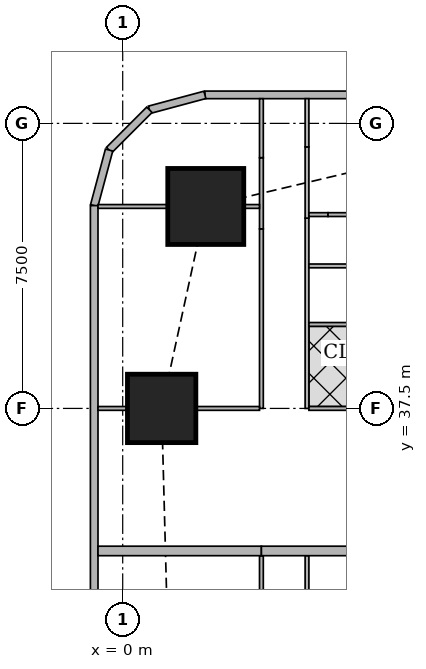
"""IFC4 building model, lengths in metres.
Left out: names, types, materials, properties, quantities, classifications, styles, units other than length and angle.
Written with IfcOpenShell. Run it as: python <this file> out.ifc"""

import sys

from ifc_helpers import new_model, si_unit, direction, frame, frame_2d, origin, origin_2d, place, context, subcontext, project, spatial, rectangle, extrude, element, fill, save


model = new_model("IFC4")
c1 = context("Model", 3, precision=1e-05, world=origin(), true_north=direction((0.0, 1.0)))
c2 = subcontext(c1, "Body", "Model", "MODEL_VIEW")
j1 = project(units=[si_unit("LENGTHUNIT", "METRE"), si_unit("PLANEANGLEUNIT", "RADIAN")], contexts=[c1])
p1 = place(None, origin())
s1 = spatial("IfcSite", under=j1, at=p1, CompositionType="ELEMENT")
p2 = place(p1, origin())
s2 = spatial("IfcBuilding", under=s1, at=p2, CompositionType="ELEMENT")
p3 = place(p2, frame((0.0, 0.0, 147.05)))
s3 = spatial("IfcBuildingStorey", under=s2, at=p3, CompositionType="ELEMENT", Elevation=147.05)
p4 = place(p3, frame((1.025, 37.5, 0.0), z_axis=(0.0, 0.0, 1.0), x_axis=(1.0, 0.0, 0.0)))
e1 = element("IfcColumn", 1, at=p4, inside=s3, PredefinedType="COLUMN", context=c2, shape_type="SweptSolid", body=[
    extrude(rectangle(XDim=1.8, YDim=1.8, at=origin_2d()), origin(), (0.0, 0.0, 1.0), 3.75),
])
p5 = place(p3, frame((2.186, 42.814, 0.0), z_axis=(0.0, 0.0, 1.0), x_axis=(1.0, 0.0, 0.0)))
e2 = element("IfcColumn", 2, at=p5, inside=s3, PredefinedType="COLUMN", context=c2, shape_type="SweptSolid", body=[
    extrude(rectangle(XDim=2.0, YDim=2.0, at=origin_2d()), origin(), (0.0, 0.0, 1.0), 3.75),
])
p6 = place(p3, frame((40.106, 45.75, 0.0), z_axis=(0.0, 0.0, 1.0), x_axis=(-1.0, 0.0, 0.0)))
e3 = element("IfcWall", 3, at=p6, inside=s3, PredefinedType="SOLIDWALL", context=c2, shape_type="SweptSolid", body=[
    extrude(rectangle(XDim=37.943, YDim=0.2, at=frame_2d((18.971, 0.0))), origin(), (0.0, 0.0, 1.0), 3.5),
])
p7 = place(p6, frame((8.606, 0.0, 0.9)))
e4 = element("IfcOpeningElement", 4, at=p7, cuts=e3, PredefinedType="OPENING", context=c2, shape_type="SweptSolid", body=[
    extrude(rectangle(XDim=1.8, YDim=1.5, at=frame_2d((0.9, 0.75))), frame((0.0, 0.11, 0.0), z_axis=(0.0, -1.0, 0.0), x_axis=(1.0, 0.0, 0.0)), (0.0, 0.0, 1.0), 0.22),
])
p8 = place(p6, frame((12.206, 0.0, 0.9)))
e5 = element("IfcOpeningElement", 5, at=p8, cuts=e3, PredefinedType="OPENING", context=c2, shape_type="SweptSolid", body=[
    extrude(rectangle(XDim=1.8, YDim=1.5, at=frame_2d((0.9, 0.75))), frame((0.0, 0.11, 0.0), z_axis=(0.0, -1.0, 0.0), x_axis=(1.0, 0.0, 0.0)), (0.0, 0.0, 1.0), 0.22),
])
p9 = place(p6, frame((15.806, 0.0, 0.9)))
e6 = element("IfcOpeningElement", 6, at=p9, cuts=e3, PredefinedType="OPENING", context=c2, shape_type="SweptSolid", body=[
    extrude(rectangle(XDim=1.8, YDim=1.5, at=frame_2d((0.9, 0.75))), frame((0.0, 0.11, 0.0), z_axis=(0.0, -1.0, 0.0), x_axis=(1.0, 0.0, 0.0)), (0.0, 0.0, 1.0), 0.22),
])
p10 = place(p6, frame((19.406, 0.0, 0.9)))
e7 = element("IfcOpeningElement", 7, at=p10, cuts=e3, PredefinedType="OPENING", context=c2, shape_type="SweptSolid", body=[
    extrude(rectangle(XDim=1.8, YDim=1.5, at=frame_2d((0.9, 0.75))), frame((0.0, 0.11, 0.0), z_axis=(0.0, -1.0, 0.0), x_axis=(1.0, 0.0, 0.0)), (0.0, 0.0, 1.0), 0.22),
])
p11 = place(p6, frame((23.006, 0.0, 0.9)))
e8 = element("IfcOpeningElement", 8, at=p11, cuts=e3, PredefinedType="OPENING", context=c2, shape_type="SweptSolid", body=[
    extrude(rectangle(XDim=1.8, YDim=1.5, at=frame_2d((0.9, 0.75))), frame((0.0, 0.11, 0.0), z_axis=(0.0, -1.0, 0.0), x_axis=(1.0, 0.0, 0.0)), (0.0, 0.0, 1.0), 0.22),
])
p12 = place(p6, frame((26.606, 0.0, 0.9)))
e9 = element("IfcOpeningElement", 9, at=p12, cuts=e3, PredefinedType="OPENING", context=c2, shape_type="SweptSolid", body=[
    extrude(rectangle(XDim=1.8, YDim=1.5, at=frame_2d((0.9, 0.75))), frame((0.0, 0.11, 0.0), z_axis=(0.0, -1.0, 0.0), x_axis=(1.0, 0.0, 0.0)), (0.0, 0.0, 1.0), 0.22),
])
p13 = place(p3, frame((2.163, 45.75, 0.0), z_axis=(0.0, 0.0, 1.0), x_axis=(-0.965832000415, -0.259168954497, 0.0)))
e10 = element("IfcWall", 10, at=p13, inside=s3, PredefinedType="SOLIDWALL", context=c2, shape_type="SweptSolid", body=[
    extrude(rectangle(XDim=1.513, YDim=0.2, at=frame_2d((0.756, 0.0))), origin(), (0.0, 0.0, 1.0), 3.5),
])
p14 = place(p3, frame((0.702, 45.358, 0.0), z_axis=(0.0, 0.0, 1.0), x_axis=(-0.707106781187, -0.707106781187, 0.0)))
e11 = element("IfcWall", 11, at=p14, inside=s3, PredefinedType="SOLIDWALL", context=c2, shape_type="SweptSolid", body=[
    extrude(rectangle(XDim=1.499, YDim=0.2, at=frame_2d((0.75, 0.0))), origin(), (0.0, 0.0, 1.0), 3.5),
])
p15 = place(p3, frame((-0.358, 44.298, 0.0), z_axis=(0.0, 0.0, 1.0), x_axis=(-0.259168954497, -0.965832000415, 0.0)))
e12 = element("IfcWall", 12, at=p15, inside=s3, PredefinedType="SOLIDWALL", context=c2, shape_type="SweptSolid", body=[
    extrude(rectangle(XDim=1.513, YDim=0.2, at=frame_2d((0.756, 0.0))), origin(), (0.0, 0.0, 1.0), 3.5),
])
p16 = place(p3, frame((-0.75, 42.837, 0.0), z_axis=(0.0, 0.0, 1.0), x_axis=(0.0, -1.0, 0.0)))
e13 = element("IfcWall", 13, at=p16, inside=s3, PredefinedType="SOLIDWALL", context=c2, shape_type="SweptSolid", body=[
    extrude(rectangle(XDim=40.674, YDim=0.2, at=frame_2d((20.337, 0.0))), origin(), (0.0, 0.0, 1.0), 3.5),
])
p17 = place(p16, frame((1.78, 0.0, 0.9)))
e14 = element("IfcOpeningElement", 14, at=p17, cuts=e13, PredefinedType="OPENING", context=c2, shape_type="SweptSolid", body=[
    extrude(rectangle(XDim=1.8, YDim=1.5, at=frame_2d((0.9, 0.75))), frame((0.0, 0.11, 0.0), z_axis=(0.0, -1.0, 0.0), x_axis=(1.0, 0.0, 0.0)), (0.0, 0.0, 1.0), 0.22),
])
p18 = place(p16, frame((6.312, 0.0, 0.9)))
e15 = element("IfcOpeningElement", 15, at=p18, cuts=e13, PredefinedType="OPENING", context=c2, shape_type="SweptSolid", body=[
    extrude(rectangle(XDim=1.8, YDim=1.5, at=frame_2d((0.9, 0.75))), frame((0.0, 0.11, 0.0), z_axis=(0.0, -1.0, 0.0), x_axis=(1.0, 0.0, 0.0)), (0.0, 0.0, 1.0), 0.22),
])
p19 = place(p16, frame((10.062, 0.0, 0.9)))
e16 = element("IfcOpeningElement", 16, at=p19, cuts=e13, PredefinedType="OPENING", context=c2, shape_type="SweptSolid", body=[
    extrude(rectangle(XDim=1.8, YDim=1.5, at=frame_2d((0.9, 0.75))), frame((0.0, 0.11, 0.0), z_axis=(0.0, -1.0, 0.0), x_axis=(1.0, 0.0, 0.0)), (0.0, 0.0, 1.0), 0.22),
])
p20 = place(p16, frame((13.812, 0.0, 0.9)))
e17 = element("IfcOpeningElement", 17, at=p20, cuts=e13, PredefinedType="OPENING", context=c2, shape_type="SweptSolid", body=[
    extrude(rectangle(XDim=1.8, YDim=1.5, at=frame_2d((0.9, 0.75))), frame((0.0, 0.11, 0.0), z_axis=(0.0, -1.0, 0.0), x_axis=(1.0, 0.0, 0.0)), (0.0, 0.0, 1.0), 0.22),
])
p21 = place(p16, frame((17.562, 0.0, 0.9)))
e18 = element("IfcOpeningElement", 18, at=p21, cuts=e13, PredefinedType="OPENING", context=c2, shape_type="SweptSolid", body=[
    extrude(rectangle(XDim=1.8, YDim=1.5, at=frame_2d((0.9, 0.75))), frame((0.0, 0.11, 0.0), z_axis=(0.0, -1.0, 0.0), x_axis=(1.0, 0.0, 0.0)), (0.0, 0.0, 1.0), 0.22),
])
p22 = place(p16, frame((21.312, 0.0, 0.9)))
e19 = element("IfcOpeningElement", 19, at=p22, cuts=e13, PredefinedType="OPENING", context=c2, shape_type="SweptSolid", body=[
    extrude(rectangle(XDim=1.8, YDim=1.5, at=frame_2d((0.9, 0.75))), frame((0.0, 0.11, 0.0), z_axis=(0.0, -1.0, 0.0), x_axis=(1.0, 0.0, 0.0)), (0.0, 0.0, 1.0), 0.22),
])
p23 = place(p16, frame((25.062, 0.0, 0.9)))
e20 = element("IfcOpeningElement", 20, at=p23, cuts=e13, PredefinedType="OPENING", context=c2, shape_type="SweptSolid", body=[
    extrude(rectangle(XDim=1.8, YDim=1.5, at=frame_2d((0.9, 0.75))), frame((0.0, 0.11, 0.0), z_axis=(0.0, -1.0, 0.0), x_axis=(1.0, 0.0, 0.0)), (0.0, 0.0, 1.0), 0.22),
])
p24 = place(p16, frame((28.812, 0.0, 0.9)))
e21 = element("IfcOpeningElement", 21, at=p24, cuts=e13, PredefinedType="OPENING", context=c2, shape_type="SweptSolid", body=[
    extrude(rectangle(XDim=1.8, YDim=1.5, at=frame_2d((0.9, 0.75))), frame((0.0, 0.11, 0.0), z_axis=(0.0, -1.0, 0.0), x_axis=(1.0, 0.0, 0.0)), (0.0, 0.0, 1.0), 0.22),
])
p25 = place(p16, frame((32.562, 0.0, 0.9)))
e22 = element("IfcOpeningElement", 22, at=p25, cuts=e13, PredefinedType="OPENING", context=c2, shape_type="SweptSolid", body=[
    extrude(rectangle(XDim=1.8, YDim=1.5, at=frame_2d((0.9, 0.75))), frame((0.0, 0.11, 0.0), z_axis=(0.0, -1.0, 0.0), x_axis=(1.0, 0.0, 0.0)), (0.0, 0.0, 1.0), 0.22),
])
p26 = place(p16, frame((37.094, 0.0, 0.9)))
e23 = element("IfcOpeningElement", 23, at=p26, cuts=e13, PredefinedType="OPENING", context=c2, shape_type="SweptSolid", body=[
    extrude(rectangle(XDim=1.8, YDim=1.5, at=frame_2d((0.9, 0.75))), frame((0.0, 0.11, 0.0), z_axis=(0.0, -1.0, 0.0), x_axis=(1.0, 0.0, 0.0)), (0.0, 0.0, 1.0), 0.22),
])
p27 = place(p3, frame((3.65, 22.5, 0.0), z_axis=(0.0, 0.0, 1.0), x_axis=(0.0, 1.0, 0.0)))
e24 = element("IfcWall", 24, at=p27, inside=s3, PredefinedType="PARTITIONING", context=c2, shape_type="SweptSolid", body=[
    extrude(rectangle(XDim=11.125, YDim=0.1, at=frame_2d((5.562, 0.0))), origin(), (0.0, 0.0, 1.0), 3.5),
])
p28 = place(p27, frame((0.2, 0.0, 0.0)))
e25 = element("IfcOpeningElement", 25, at=p28, cuts=e24, PredefinedType="OPENING", context=c2, shape_type="SweptSolid", body=[
    extrude(rectangle(XDim=0.9, YDim=2.1, at=frame_2d((0.45, 1.05))), frame((0.0, 0.06, 0.0), z_axis=(0.0, -1.0, 0.0), x_axis=(1.0, 0.0, 0.0)), (0.0, 0.0, 1.0), 0.12),
])
p29 = place(p27, frame((3.95, 0.0, 0.0)))
e26 = element("IfcOpeningElement", 26, at=p29, cuts=e24, PredefinedType="OPENING", context=c2, shape_type="SweptSolid", body=[
    extrude(rectangle(XDim=0.9, YDim=2.1, at=frame_2d((0.45, 1.05))), frame((0.0, 0.06, 0.0), z_axis=(0.0, -1.0, 0.0), x_axis=(1.0, 0.0, 0.0)), (0.0, 0.0, 1.0), 0.12),
])
p30 = place(p27, frame((7.7, 0.0, 0.0)))
e27 = element("IfcOpeningElement", 27, at=p30, cuts=e24, PredefinedType="OPENING", context=c2, shape_type="SweptSolid", body=[
    extrude(rectangle(XDim=0.9, YDim=2.1, at=frame_2d((0.45, 1.05))), frame((0.0, 0.06, 0.0), z_axis=(0.0, -1.0, 0.0), x_axis=(1.0, 0.0, 0.0)), (0.0, 0.0, 1.0), 0.12),
])
p31 = place(p3, frame((4.85, 22.5, 0.0), z_axis=(0.0, 0.0, 1.0), x_axis=(0.0, 1.0, 0.0)))
e28 = element("IfcWall", 28, at=p31, inside=s3, PredefinedType="PARTITIONING", context=c2, shape_type="SweptSolid", body=[
    extrude(rectangle(XDim=11.125, YDim=0.1, at=frame_2d((5.562, 0.0))), origin(), (0.0, 0.0, 1.0), 3.5),
])
p32 = place(p31, frame((0.655, 0.0, 0.0)))
e29 = element("IfcOpeningElement", 29, at=p32, cuts=e28, PredefinedType="OPENING", context=c2, shape_type="SweptSolid", body=[
    extrude(rectangle(XDim=0.9, YDim=2.1, at=frame_2d((0.45, 1.05))), frame((0.0, 0.06, 0.0), z_axis=(0.0, -1.0, 0.0), x_axis=(1.0, 0.0, 0.0)), (0.0, 0.0, 1.0), 0.12),
])
p33 = place(p31, frame((4.1, 0.0, 0.0)))
e30 = element("IfcOpeningElement", 30, at=p33, cuts=e28, PredefinedType="OPENING", context=c2, shape_type="SweptSolid", body=[
    extrude(rectangle(XDim=0.9, YDim=2.1, at=frame_2d((0.45, 1.05))), frame((0.0, 0.06, 0.0), z_axis=(0.0, -1.0, 0.0), x_axis=(1.0, 0.0, 0.0)), (0.0, 0.0, 1.0), 0.12),
])
p34 = place(p31, frame((7.96, 0.0, 0.0)))
e31 = element("IfcOpeningElement", 31, at=p34, cuts=e28, PredefinedType="OPENING", context=c2, shape_type="SweptSolid", body=[
    extrude(rectangle(XDim=0.9, YDim=2.1, at=frame_2d((0.45, 1.05))), frame((0.0, 0.06, 0.0), z_axis=(0.0, -1.0, 0.0), x_axis=(1.0, 0.0, 0.0)), (0.0, 0.0, 1.0), 0.12),
])
p35 = place(p31, frame((2.53, 0.0, 0.0)))
e32 = element("IfcOpeningElement", 32, at=p35, cuts=e28, PredefinedType="OPENING", context=c2, shape_type="SweptSolid", body=[
    extrude(rectangle(XDim=0.9, YDim=2.1, at=frame_2d((0.45, 1.05))), frame((0.0, 0.06, 0.0), z_axis=(0.0, -1.0, 0.0), x_axis=(1.0, 0.0, 0.0)), (0.0, 0.0, 1.0), 0.12),
])
p36 = place(p31, frame((5.975, 0.0, 0.0)))
e33 = element("IfcOpeningElement", 33, at=p36, cuts=e28, PredefinedType="OPENING", context=c2, shape_type="SweptSolid", body=[
    extrude(rectangle(XDim=0.9, YDim=2.1, at=frame_2d((0.45, 1.05))), frame((0.0, 0.06, 0.0), z_axis=(0.0, -1.0, 0.0), x_axis=(1.0, 0.0, 0.0)), (0.0, 0.0, 1.0), 0.12),
])
p37 = place(p31, frame((9.835, 0.0, 0.0)))
e34 = element("IfcOpeningElement", 34, at=p37, cuts=e28, PredefinedType="OPENING", context=c2, shape_type="SweptSolid", body=[
    extrude(rectangle(XDim=0.9, YDim=2.1, at=frame_2d((0.45, 1.05))), frame((0.0, 0.06, 0.0), z_axis=(0.0, -1.0, 0.0), x_axis=(1.0, 0.0, 0.0)), (0.0, 0.0, 1.0), 0.12),
])
p38 = place(p3, frame((3.65, 37.5, 0.0), z_axis=(0.0, 0.0, 1.0), x_axis=(0.0, 1.0, 0.0)))
e35 = element("IfcWall", 35, at=p38, inside=s3, PredefinedType="PARTITIONING", context=c2, shape_type="SweptSolid", body=[
    extrude(rectangle(XDim=4.724, YDim=0.1, at=frame_2d((2.362, 0.0))), origin(), (0.0, 0.0, 1.0), 3.5),
])
p39 = place(p38, frame((0.2, 0.0, 0.0)))
e36 = element("IfcOpeningElement", 36, at=p39, cuts=e35, PredefinedType="OPENING", context=c2, shape_type="SweptSolid", body=[
    extrude(rectangle(XDim=0.9, YDim=2.1, at=frame_2d((0.45, 1.05))), frame((0.0, 0.06, 0.0), z_axis=(0.0, -1.0, 0.0), x_axis=(1.0, 0.0, 0.0)), (0.0, 0.0, 1.0), 0.12),
])
p40 = place(p3, frame((3.65, 42.224, 0.0), z_axis=(0.0, 0.0, 1.0), x_axis=(0.0, 1.0, 0.0)))
e37 = element("IfcWall", 37, at=p40, inside=s3, PredefinedType="PARTITIONING", context=c2, shape_type="SweptSolid", body=[
    extrude(rectangle(XDim=1.873, YDim=0.1, at=frame_2d((0.937, 0.0))), origin(), (0.0, 0.0, 1.0), 2.1),
])
p41 = place(p3, frame((3.65, 44.097, 0.0), z_axis=(0.0, 0.0, 1.0), x_axis=(0.0, 1.0, 0.0)))
e38 = element("IfcWall", 38, at=p41, inside=s3, PredefinedType="PARTITIONING", context=c2, shape_type="SweptSolid", body=[
    extrude(rectangle(XDim=1.553, YDim=0.1, at=frame_2d((0.776, 0.0))), origin(), (0.0, 0.0, 1.0), 3.5),
])
p42 = place(p3, frame((4.85, 37.5, 0.0), z_axis=(0.0, 0.0, 1.0), x_axis=(0.0, 1.0, 0.0)))
e39 = element("IfcWall", 39, at=p42, inside=s3, PredefinedType="PARTITIONING", context=c2, shape_type="SweptSolid", body=[
    extrude(rectangle(XDim=5.007, YDim=0.1, at=frame_2d((2.503, 0.0))), origin(), (0.0, 0.0, 1.0), 3.5),
])
p43 = place(p42, frame((0.655, 0.0, 0.0)))
e40 = element("IfcOpeningElement", 40, at=p43, cuts=e39, PredefinedType="OPENING", context=c2, shape_type="SweptSolid", body=[
    extrude(rectangle(XDim=0.9, YDim=2.1, at=frame_2d((0.45, 1.05))), frame((0.0, 0.06, 0.0), z_axis=(0.0, -1.0, 0.0), x_axis=(1.0, 0.0, 0.0)), (0.0, 0.0, 1.0), 0.12),
])
p44 = place(p42, frame((2.53, 0.0, 0.0)))
e41 = element("IfcOpeningElement", 41, at=p44, cuts=e39, PredefinedType="OPENING", context=c2, shape_type="SweptSolid", body=[
    extrude(rectangle(XDim=0.9, YDim=2.1, at=frame_2d((0.45, 1.05))), frame((0.0, 0.06, 0.0), z_axis=(0.0, -1.0, 0.0), x_axis=(1.0, 0.0, 0.0)), (0.0, 0.0, 1.0), 0.12),
])
p45 = place(p3, frame((4.85, 42.507, 0.0), z_axis=(0.0, 0.0, 1.0), x_axis=(0.0, 1.0, 0.0)))
e42 = element("IfcWall", 42, at=p45, inside=s3, PredefinedType="PARTITIONING", context=c2, shape_type="SweptSolid", body=[
    extrude(rectangle(XDim=1.874, YDim=0.1, at=frame_2d((0.937, 0.0))), origin(), (0.0, 0.0, 1.0), 2.1),
])
p46 = place(p3, frame((4.85, 44.381, 0.0), z_axis=(0.0, 0.0, 1.0), x_axis=(0.0, 1.0, 0.0)))
e43 = element("IfcWall", 43, at=p46, inside=s3, PredefinedType="PARTITIONING", context=c2, shape_type="SweptSolid", body=[
    extrude(rectangle(XDim=1.269, YDim=0.1, at=frame_2d((0.634, 0.0))), origin(), (0.0, 0.0, 1.0), 3.5),
])
p47 = place(p46, frame((0.15, 0.0, 0.0)))
e44 = element("IfcOpeningElement", 44, at=p47, cuts=e43, PredefinedType="OPENING", context=c2, shape_type="SweptSolid", body=[
    extrude(rectangle(XDim=0.9, YDim=2.1, at=frame_2d((0.45, 1.05))), frame((0.0, 0.06, 0.0), z_axis=(0.0, -1.0, 0.0), x_axis=(1.0, 0.0, 0.0)), (0.0, 0.0, 1.0), 0.12),
])
p48 = place(p3, frame((-0.65, 37.5, 0.0), z_axis=(0.0, 0.0, 1.0), x_axis=(1.0, 0.0, 0.0)))
e45 = element("IfcWall", 45, at=p48, inside=s3, PredefinedType="PARTITIONING", context=c2, shape_type="SweptSolid", body=[
    extrude(rectangle(XDim=0.774, YDim=0.1, at=frame_2d((0.387, 0.0))), origin(), (0.0, 0.0, 1.0), 3.5),
])
p49 = place(p3, frame((1.926, 37.5, 0.0), z_axis=(0.0, 0.0, 1.0), x_axis=(1.0, 0.0, 0.0)))
e46 = element("IfcWall", 46, at=p49, inside=s3, PredefinedType="PARTITIONING", context=c2, shape_type="SweptSolid", body=[
    extrude(rectangle(XDim=1.674, YDim=0.1, at=frame_2d((0.837, 0.0))), origin(), (0.0, 0.0, 1.0), 2.1),
])
p50 = place(p3, frame((-0.65, 42.814, 0.0), z_axis=(0.0, 0.0, 1.0), x_axis=(1.0, 0.0, 0.0)))
e47 = element("IfcWall", 47, at=p50, inside=s3, PredefinedType="PARTITIONING", context=c2, shape_type="SweptSolid", body=[
    extrude(rectangle(XDim=1.835, YDim=0.1, at=frame_2d((0.917, 0.0))), origin(), (0.0, 0.0, 1.0), 3.5),
])
p51 = place(p3, frame((3.187, 42.814, 0.0), z_axis=(0.0, 0.0, 1.0), x_axis=(1.0, 0.0, 0.0)))
e48 = element("IfcWall", 48, at=p51, inside=s3, PredefinedType="PARTITIONING", context=c2, shape_type="SweptSolid", body=[
    extrude(rectangle(XDim=0.413, YDim=0.1, at=frame_2d((0.207, 0.0))), origin(), (0.0, 0.0, 1.0), 2.1),
])
p52 = place(p3, frame((4.9, 37.5, 0.0), z_axis=(0.0, 0.0, 1.0), x_axis=(1.0, 0.0, 0.0)))
e49 = element("IfcWall", 49, at=p52, inside=s3, PredefinedType="PARTITIONING", context=c2, shape_type="SweptSolid", body=[
    extrude(rectangle(XDim=1.549, YDim=0.1, at=frame_2d((0.774, 0.0))), origin(), (0.0, 0.0, 1.0), 3.5),
])
for number, where, z_axis, x_axis in (
    (50, (4.9, 41.25, 0.0), (0.0, 0.0, 1.0), (1.0, 0.0, 0.0)),
    (51, (4.9, 39.71, 0.0), (0.0, 0.0, 1.0), (1.0, 0.0, 0.0)),
):
    element("IfcWall", number, at=place(p3, frame(where, z_axis=z_axis, x_axis=x_axis)), inside=s3, PredefinedType="PARTITIONING", context=c2, shape_type="SweptSolid", body=[
        extrude(rectangle(XDim=3.275, YDim=0.1, at=frame_2d((1.638, 0.0))), origin(), (0.0, 0.0, 1.0), 3.5),
    ])
p53 = place(p3, frame((-0.65, 33.75, 0.0), z_axis=(0.0, 0.0, 1.0), x_axis=(1.0, 0.0, 0.0)))
e52 = element("IfcWall", 52, at=p53, inside=s3, PredefinedType="SOLIDWALL", context=c2, shape_type="SweptSolid", body=[
    extrude(rectangle(XDim=4.3, YDim=0.25, at=frame_2d((2.15, 0.0))), origin(), (0.0, 0.0, 1.0), 2.1),
])
p54 = place(p3, frame((3.65, 33.75, 0.0), z_axis=(0.0, 0.0, 1.0), x_axis=(1.0, 0.0, 0.0)))
e53 = element("IfcWall", 53, at=p54, inside=s3, PredefinedType="SOLIDWALL", context=c2, shape_type="SweptSolid", body=[
    extrude(rectangle(XDim=4.525, YDim=0.25, at=frame_2d((2.263, 0.0))), origin(), (0.0, 0.0, 1.0), 3.5),
])
p55 = place(p3, frame((4.9, 42.6, 0.0), z_axis=(0.0, 0.0, 1.0), x_axis=(1.0, 0.0, 0.0)))
e54 = element("IfcWall", 54, at=p55, inside=s3, PredefinedType="PARTITIONING", context=c2, shape_type="SweptSolid", body=[
    extrude(rectangle(XDim=0.503, YDim=0.1, at=frame_2d((0.251, 0.0))), origin(), (0.0, 0.0, 1.0), 2.1),
])
p56 = place(p3, frame((5.403, 42.6, 0.0), z_axis=(0.0, 0.0, 1.0), x_axis=(1.0, 0.0, 0.0)))
e55 = element("IfcWall", 55, at=p56, inside=s3, PredefinedType="PARTITIONING", context=c2, shape_type="SweptSolid", body=[
    extrude(rectangle(XDim=2.772, YDim=0.1, at=frame_2d((1.386, 0.0))), origin(), (0.0, 0.0, 1.0), 3.5),
])
p57 = place(p56, frame((0.15, 0.0, 0.0)))
e56 = element("IfcOpeningElement", 56, at=p57, cuts=e55, PredefinedType="OPENING", context=c2, shape_type="SweptSolid", body=[
    extrude(rectangle(XDim=0.9, YDim=2.1, at=frame_2d((0.45, 1.05))), frame((0.0, 0.06, 0.0), z_axis=(0.0, -1.0, 0.0), x_axis=(1.0, 0.0, 0.0)), (0.0, 0.0, 1.0), 0.12),
])
p58 = place(p17, origin())
e57 = element("IfcWindow", 57, at=p58, inside=s3, PartitioningType="SINGLE_PANEL", PredefinedType="WINDOW", context=c2, shape_type="SweptSolid", body=[
    extrude(rectangle(XDim=1.8, YDim=1.5, at=frame_2d((0.9, 0.75))), frame((0.0, 0.03, 0.0), z_axis=(0.0, -1.0, 0.0), x_axis=(1.0, 0.0, 0.0)), (0.0, 0.0, 1.0), 0.06),
])
fill(e14, e57)
p59 = place(p18, origin())
e58 = element("IfcWindow", 58, at=p59, inside=s3, PartitioningType="SINGLE_PANEL", PredefinedType="WINDOW", context=c2, shape_type="SweptSolid", body=[
    extrude(rectangle(XDim=1.8, YDim=1.5, at=frame_2d((0.9, 0.75))), frame((0.0, 0.03, 0.0), z_axis=(0.0, -1.0, 0.0), x_axis=(1.0, 0.0, 0.0)), (0.0, 0.0, 1.0), 0.06),
])
fill(e15, e58)
p60 = place(p19, origin())
e59 = element("IfcWindow", 59, at=p60, inside=s3, PartitioningType="SINGLE_PANEL", PredefinedType="WINDOW", context=c2, shape_type="SweptSolid", body=[
    extrude(rectangle(XDim=1.8, YDim=1.5, at=frame_2d((0.9, 0.75))), frame((0.0, 0.03, 0.0), z_axis=(0.0, -1.0, 0.0), x_axis=(1.0, 0.0, 0.0)), (0.0, 0.0, 1.0), 0.06),
])
fill(e16, e59)
p61 = place(p37, origin())
e60 = element("IfcDoor", 60, at=p61, inside=s3, OperationType="SINGLE_SWING_LEFT", PredefinedType="DOOR", context=c2, shape_type="SweptSolid", body=[
    extrude(rectangle(XDim=0.9, YDim=2.1, at=frame_2d((0.45, 1.05))), frame((0.0, 0.025, 0.0), z_axis=(0.0, -1.0, 0.0), x_axis=(1.0, 0.0, 0.0)), (0.0, 0.0, 1.0), 0.05),
])
fill(e34, e60)
p62 = place(p39, origin())
e61 = element("IfcDoor", 61, at=p62, inside=s3, OperationType="SINGLE_SWING_LEFT", PredefinedType="DOOR", context=c2, shape_type="SweptSolid", body=[
    extrude(rectangle(XDim=0.9, YDim=2.1, at=frame_2d((0.45, 1.05))), frame((0.0, 0.025, 0.0), z_axis=(0.0, -1.0, 0.0), x_axis=(1.0, 0.0, 0.0)), (0.0, 0.0, 1.0), 0.05),
])
fill(e36, e61)
p63 = place(p43, origin())
e62 = element("IfcDoor", 62, at=p63, inside=s3, OperationType="SINGLE_SWING_RIGHT", PredefinedType="DOOR", context=c2, shape_type="SweptSolid", body=[
    extrude(rectangle(XDim=0.9, YDim=2.1, at=frame_2d((0.45, 1.05))), frame((0.0, 0.025, 0.0), z_axis=(0.0, -1.0, 0.0), x_axis=(1.0, 0.0, 0.0)), (0.0, 0.0, 1.0), 0.05),
])
fill(e40, e62)
p64 = place(p47, origin())
e63 = element("IfcDoor", 63, at=p64, inside=s3, OperationType="SINGLE_SWING_RIGHT", PredefinedType="DOOR", context=c2, shape_type="SweptSolid", body=[
    extrude(rectangle(XDim=0.9, YDim=2.1, at=frame_2d((0.45, 1.05))), frame((0.0, 0.025, 0.0), z_axis=(0.0, -1.0, 0.0), x_axis=(1.0, 0.0, 0.0)), (0.0, 0.0, 1.0), 0.05),
])
fill(e44, e63)
p65 = place(p44, origin())
e64 = element("IfcDoor", 64, at=p65, inside=s3, OperationType="SINGLE_SWING_LEFT", PredefinedType="DOOR", context=c2, shape_type="SweptSolid", body=[
    extrude(rectangle(XDim=0.9, YDim=2.1, at=frame_2d((0.45, 1.05))), frame((0.0, 0.025, 0.0), z_axis=(0.0, -1.0, 0.0), x_axis=(1.0, 0.0, 0.0)), (0.0, 0.0, 1.0), 0.05),
])
fill(e41, e64)
p66 = place(p57, origin())
e65 = element("IfcDoor", 65, at=p66, inside=s3, OperationType="SINGLE_SWING_LEFT", PredefinedType="DOOR", context=c2, shape_type="SweptSolid", body=[
    extrude(rectangle(XDim=0.9, YDim=2.1, at=frame_2d((0.45, 1.05))), frame((0.0, 0.025, 0.0), z_axis=(0.0, -1.0, 0.0), x_axis=(1.0, 0.0, 0.0)), (0.0, 0.0, 1.0), 0.05),
])
fill(e56, e65)
save(model, sys.argv[1])
